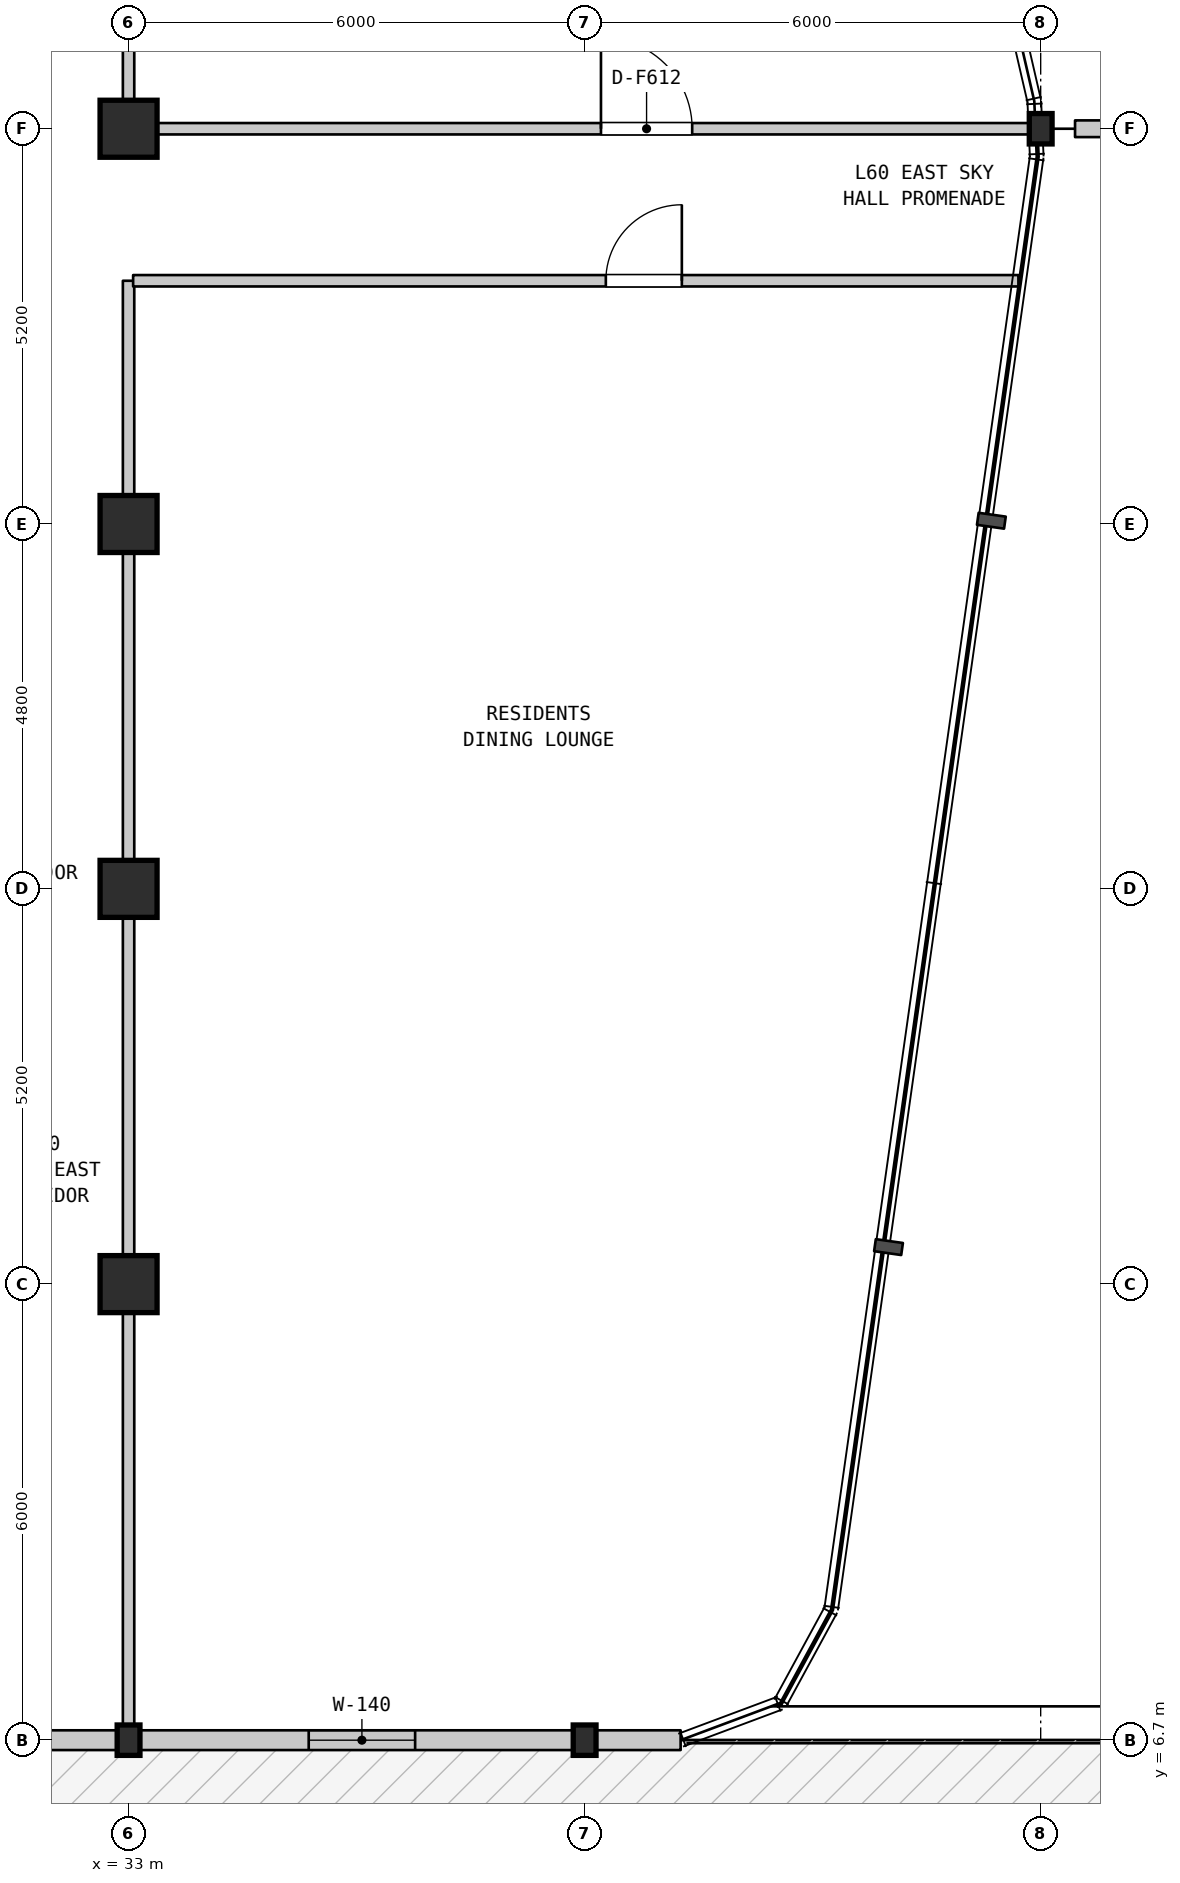
"""IFC4 building model, lengths in metres.
Left out: names, types, materials, properties, quantities, classifications, styles, units other than length and angle.
Written with IfcOpenShell. Run it as: python <this file> out.ifc"""

import sys

from ifc_helpers import new_model, si_unit, direction, frame, frame_2d, origin, origin_2d, place, context, subcontext, project, spatial, rectangle, i_section, extrude, element, fill, save


model = new_model("IFC4")
c1 = context("Model", 3, precision=1e-05, world=origin(), true_north=direction((0.0, 1.0)))
c2 = subcontext(c1, "Body", "Model", "MODEL_VIEW")
j1 = project(units=[si_unit("LENGTHUNIT", "METRE"), si_unit("PLANEANGLEUNIT", "RADIAN")], contexts=[c1])
p1 = place(None, origin())
s1 = spatial("IfcSite", under=j1, at=p1, CompositionType="ELEMENT")
p2 = place(p1, origin())
s2 = spatial("IfcBuilding", under=s1, at=p2, CompositionType="ELEMENT")
p3 = place(p2, frame((0.0, 0.0, 242.8)))
s3 = spatial("IfcBuildingStorey", under=s2, at=p3, CompositionType="ELEMENT", Elevation=242.8)
p4 = place(p3, frame((33.0, 6.7, 0.0), z_axis=(0.0, 0.0, 1.0), x_axis=(1.0, 0.0, 0.0)))
e1 = element("IfcColumn", 1, at=p4, inside=s3, PredefinedType="COLUMN", context=c2, shape_type="SweptSolid", body=[
    extrude(i_section(OverallWidth=0.3, OverallDepth=0.4, WebThickness=0.013, FlangeThickness=0.024, FilletRadius=0.027, at=origin_2d()), origin(), (0.0, 0.0, 1.0), 4.5),
])
for number, where, z_axis, x_axis in (
    (2, (33.0, 12.7, 0.0), (0.0, 0.0, 1.0), (1.0, 0.0, 0.0)),
    (3, (33.0, 17.9, 0.0), (0.0, 0.0, 1.0), (1.0, 0.0, 0.0)),
    (4, (33.0, 22.7, 0.0), (0.0, 0.0, 1.0), (1.0, 0.0, 0.0)),
    (5, (33.0, 27.9, 0.0), (0.0, 0.0, 1.0), (1.0, 0.0, 0.0)),
):
    element("IfcColumn", number, at=place(p3, frame(where, z_axis=z_axis, x_axis=x_axis)), inside=s3, PredefinedType="COLUMN", context=c2, shape_type="SweptSolid", body=[
        extrude(rectangle(XDim=0.75, YDim=0.75, at=origin_2d()), origin(), (0.0, 0.0, 1.0), 4.5),
    ])
for number, where, z_axis, x_axis in (
    (6, (39.0, 6.7, 0.0), (0.0, 0.0, 1.0), (1.0, 0.0, 0.0)),
    (7, (45.0, 27.9, 0.0), (0.0, 0.0, 1.0), (1.0, 0.0, 0.0)),
):
    element("IfcColumn", number, at=place(p3, frame(where, z_axis=z_axis, x_axis=x_axis)), inside=s3, PredefinedType="COLUMN", context=c2, shape_type="SweptSolid", body=[
        extrude(i_section(OverallWidth=0.3, OverallDepth=0.4, WebThickness=0.013, FlangeThickness=0.024, FilletRadius=0.027, at=origin_2d()), origin(), (0.0, 0.0, 1.0), 4.5),
    ])
p5 = place(p3, frame((40.263, 6.7, 0.0), z_axis=(0.0, 0.0, 1.0), x_axis=(-1.0, 0.0, 0.0)))
e8 = element("IfcWall", 8, at=p5, inside=s3, PredefinedType="STANDARD", context=c2, shape_type="SweptSolid", body=[
    extrude(rectangle(XDim=1.263, YDim=0.26, at=frame_2d((0.631, 0.0))), origin(), (0.0, 0.0, 1.0), 4.19),
])
p6 = place(p3, frame((45.452, 27.9, 0.0), z_axis=(0.0, 0.0, 1.0), x_axis=(1.0, 0.0, 0.0)))
e9 = element("IfcWall", 9, at=p6, inside=s3, PredefinedType="PARAPET", context=c2, shape_type="SweptSolid", body=[
    extrude(rectangle(XDim=9.548, YDim=0.22, at=frame_2d((4.774, 0.0))), origin(), (0.0, 0.0, 1.0), 0.55),
])
p7 = place(p3, frame((33.0, 6.71, 0.0), z_axis=(0.0, 0.0, 1.0), x_axis=(0.0, 1.0, 0.0)))
e10 = element("IfcWall", 10, at=p7, inside=s3, PredefinedType="STANDARD", context=c2, shape_type="SweptSolid", body=[
    extrude(rectangle(XDim=19.19, YDim=0.15, at=frame_2d((9.595, 0.0))), origin(), (0.0, 0.0, 1.0), 3.9),
])
p8 = place(p3, frame((33.0, 27.9, 0.0), z_axis=(0.0, 0.0, 1.0), x_axis=(0.0, 1.0, 0.0)))
e11 = element("IfcWall", 11, at=p8, inside=s3, PredefinedType="STANDARD", context=c2, shape_type="SweptSolid", body=[
    extrude(rectangle(XDim=10.0, YDim=0.15, at=frame_2d((5.0, 0.0))), origin(), (0.0, 0.0, 1.0), 3.69),
])
p9 = place(p3, frame((33.06, 25.9, 0.0), z_axis=(0.0, 0.0, 1.0), x_axis=(1.0, 0.0, 0.0)))
e12 = element("IfcWall", 12, at=p9, inside=s3, PredefinedType="STANDARD", context=c2, shape_type="SweptSolid", body=[
    extrude(rectangle(XDim=11.647, YDim=0.15, at=frame_2d((5.823, 0.0))), origin(), (0.0, 0.0, 1.0), 4.19),
])
p10 = place(p9, frame((6.219, 0.0, 0.0)))
e13 = element("IfcOpeningElement", 13, at=p10, cuts=e12, PredefinedType="OPENING", context=c2, shape_type="SweptSolid", body=[
    extrude(rectangle(XDim=1.0, YDim=2.15, at=frame_2d((0.5, 1.075))), frame((0.0, 0.085, 0.0), z_axis=(0.0, -1.0, 0.0), x_axis=(1.0, 0.0, 0.0)), (0.0, 0.0, 1.0), 0.17),
])
p11 = place(p3, frame((33.06, 27.9, 0.0), z_axis=(0.0, 0.0, 1.0), x_axis=(1.0, 0.0, 0.0)))
e14 = element("IfcWall", 14, at=p11, inside=s3, PredefinedType="STANDARD", context=c2, shape_type="SweptSolid", body=[
    extrude(rectangle(XDim=11.862, YDim=0.15, at=frame_2d((5.931, 0.0))), origin(), (0.0, 0.0, 1.0), 3.69),
])
p12 = place(p11, frame((6.155, 0.0, 0.0)))
e15 = element("IfcOpeningElement", 15, at=p12, cuts=e14, PredefinedType="OPENING", context=c2, shape_type="SweptSolid", body=[
    extrude(rectangle(XDim=1.2, YDim=2.2, at=frame_2d((0.6, 1.1))), frame((0.0, 0.085, 0.0), z_axis=(0.0, -1.0, 0.0), x_axis=(1.0, 0.0, 0.0)), (0.0, 0.0, 1.0), 0.17),
])
p13 = place(p3, frame((39.0, 6.7, 0.0), z_axis=(0.0, 0.0, 1.0), x_axis=(-1.0, 0.0, 0.0)))
e16 = element("IfcWall", 16, at=p13, inside=s3, PredefinedType="STANDARD", context=c2, shape_type="SweptSolid", body=[
    extrude(rectangle(XDim=17.24, YDim=0.26, at=frame_2d((8.62, 0.0))), origin(), (0.0, 0.0, 1.0), 3.84),
])
p14 = place(p13, frame((7.288, 0.0, 0.0)))
e17 = element("IfcOpeningElement", 17, at=p14, cuts=e16, PredefinedType="OPENING", context=c2, shape_type="SweptSolid", body=[
    extrude(rectangle(XDim=1.4, YDim=2.2, at=frame_2d((0.7, 1.1))), frame((0.0, 0.14, 0.0), z_axis=(0.0, -1.0, 0.0), x_axis=(1.0, 0.0, 0.0)), (0.0, 0.0, 1.0), 0.28),
])
p15 = place(p13, frame((2.23, 0.0, 0.9)))
e18 = element("IfcOpeningElement", 18, at=p15, cuts=e16, PredefinedType="OPENING", context=c2, shape_type="SweptSolid", body=[
    extrude(rectangle(XDim=1.4, YDim=1.85, at=frame_2d((0.7, 0.925))), frame((0.0, 0.14, 0.0), z_axis=(0.0, -1.0, 0.0), x_axis=(1.0, 0.0, 0.0)), (0.0, 0.0, 1.0), 0.28),
])
p16 = place(p13, frame((9.367, 0.0, 0.9)))
e19 = element("IfcOpeningElement", 19, at=p16, cuts=e16, PredefinedType="OPENING", context=c2, shape_type="SweptSolid", body=[
    extrude(rectangle(XDim=1.3, YDim=1.9, at=frame_2d((0.65, 0.95))), frame((0.0, 0.14, 0.0), z_axis=(0.0, -1.0, 0.0), x_axis=(1.0, 0.0, 0.0)), (0.0, 0.0, 1.0), 0.28),
])
p17 = place(p13, frame((13.196, 0.0, 0.9)))
e20 = element("IfcOpeningElement", 20, at=p17, cuts=e16, PredefinedType="OPENING", context=c2, shape_type="SweptSolid", body=[
    extrude(rectangle(XDim=1.4, YDim=1.85, at=frame_2d((0.7, 0.925))), frame((0.0, 0.14, 0.0), z_axis=(0.0, -1.0, 0.0), x_axis=(1.0, 0.0, 0.0)), (0.0, 0.0, 1.0), 0.28),
])
p18 = place(p15, origin())
e21 = element("IfcWindow", 21, at=p18, inside=s3, PartitioningType="SINGLE_PANEL", PredefinedType="WINDOW", context=c2, shape_type="SweptSolid", body=[
    extrude(rectangle(XDim=1.4, YDim=1.85, at=frame_2d((0.7, 0.925))), frame((0.0, 0.03, 0.0), z_axis=(0.0, -1.0, 0.0), x_axis=(1.0, 0.0, 0.0)), (0.0, 0.0, 1.0), 0.06),
])
fill(e18, e21)
p19 = place(p10, origin())
e22 = element("IfcDoor", 22, at=p19, inside=s3, OperationType="SINGLE_SWING_RIGHT", PredefinedType="DOOR", context=c2, shape_type="SweptSolid", body=[
    extrude(rectangle(XDim=1.0, YDim=2.15, at=frame_2d((0.5, 1.075))), frame((0.0, 0.025, 0.0), z_axis=(0.0, -1.0, 0.0), x_axis=(1.0, 0.0, 0.0)), (0.0, 0.0, 1.0), 0.05),
])
fill(e13, e22)
p20 = place(p12, origin())
e23 = element("IfcDoor", 23, at=p20, inside=s3, OperationType="SINGLE_SWING_LEFT", PredefinedType="DOOR", context=c2, shape_type="SweptSolid", body=[
    extrude(rectangle(XDim=1.2, YDim=2.2, at=frame_2d((0.6, 1.1))), frame((0.0, 0.025, 0.0), z_axis=(0.0, -1.0, 0.0), x_axis=(1.0, 0.0, 0.0)), (0.0, 0.0, 1.0), 0.05),
])
fill(e15, e23)
save(model, sys.argv[1])
